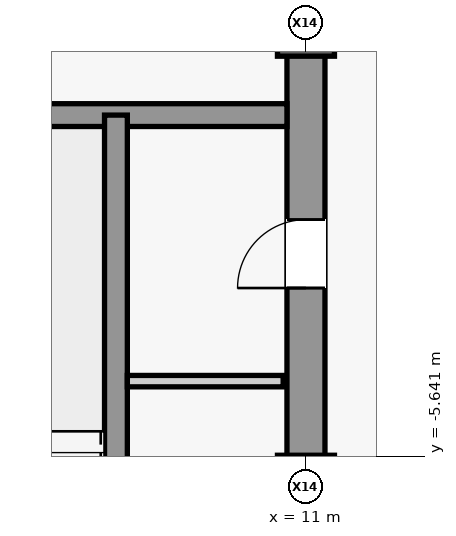
"""IFC4 building model, lengths in metres.
Left out: names, types, materials, properties, quantities, classifications, styles, units other than length and angle.
Written with IfcOpenShell. Run it as: python <this file> out.ifc"""

import sys

from ifc_helpers import new_model, si_unit, direction, frame, frame_2d, origin, origin_2d, place, context, subcontext, project, spatial, rectangle, extrude, source, transform, mapped, element, fill, save


model = new_model("IFC4")
c1 = context("Model", 3, precision=1e-05, world=origin(), true_north=direction((0.0, 1.0)))
c2 = subcontext(c1, "Body", "Model", "MODEL_VIEW")
j1 = project(units=[si_unit("LENGTHUNIT", "METRE"), si_unit("PLANEANGLEUNIT", "RADIAN")], contexts=[c1])
p1 = place(None, origin())
s1 = spatial("IfcSite", under=j1, at=p1, CompositionType="ELEMENT")
p2 = place(p1, origin())
s2 = spatial("IfcBuilding", under=s1, at=p2, CompositionType="ELEMENT")
p3 = place(p2, frame((0.0, 0.0, 389.9)))
s3 = spatial("IfcBuildingStorey", under=s2, at=p3, CompositionType="ELEMENT", Elevation=389.9)
m1 = source(origin(), c2, "Body", "SweptSolid", [
    extrude(rectangle(XDim=22.0, YDim=0.5, at=frame_2d((11.0, 0.0))), origin(), (0.0, 0.0, 1.0), 4.45),
])
p4 = place(p3, frame((11.0, -11.0, 0.0), z_axis=(0.0, 0.0, 1.0), x_axis=(0.0, 1.0, 0.0)))
e1 = element("IfcWall", 1, at=p4, inside=s3, PredefinedType="SHEAR", context=c2, shape_type="MappedRepresentation", body=[
    mapped(m1, transform((0.0, 0.0, 0.0), scale=1.0)),
])
m2 = source(origin(), c2, "Body", "SweptSolid", [
    extrude(rectangle(XDim=1.1, YDim=2.2, at=frame_2d((0.55, 1.1))), frame((0.0, 0.26, 0.0), z_axis=(0.0, -1.0, 0.0), x_axis=(1.0, 0.0, 0.0)), (0.0, 0.0, 1.0), 0.52),
])
p5 = place(p4, frame((0.8, 0.0, 0.0)))
e2 = element("IfcOpeningElement", 2, at=p5, cuts=e1, PredefinedType="OPENING", context=c2, shape_type="MappedRepresentation", body=[
    mapped(m2, transform((0.0, 0.0, 0.0), scale=1.0)),
])
m3 = source(origin(), c2, "Body", "SweptSolid", [
    extrude(rectangle(XDim=0.9, YDim=2.15, at=frame_2d((0.45, 1.075))), frame((0.0, 0.26, 0.0), z_axis=(0.0, -1.0, 0.0), x_axis=(1.0, 0.0, 0.0)), (0.0, 0.0, 1.0), 0.52),
])
p6 = place(p4, frame((7.575, 0.0, 0.0)))
e3 = element("IfcOpeningElement", 3, at=p6, cuts=e1, PredefinedType="OPENING", context=c2, shape_type="MappedRepresentation", body=[
    mapped(m3, transform((0.0, 0.0, 0.0), scale=1.0)),
])
m4 = source(origin(), c2, "Body", "SweptSolid", [
    extrude(rectangle(XDim=1.3, YDim=2.3, at=frame_2d((0.65, 1.15))), frame((0.0, 0.26, 0.0), z_axis=(0.0, -1.0, 0.0), x_axis=(1.0, 0.0, 0.0)), (0.0, 0.0, 1.0), 0.52),
])
p7 = place(p4, frame((2.7, 0.0, 0.0)))
e4 = element("IfcOpeningElement", 4, at=p7, cuts=e1, PredefinedType="OPENING", context=c2, shape_type="MappedRepresentation", body=[
    mapped(m4, transform((0.0, 0.0, 0.0), scale=1.0)),
])
p8 = place(p4, frame((13.35, 0.0, 0.0)))
e5 = element("IfcOpeningElement", 5, at=p8, cuts=e1, PredefinedType="OPENING", context=c2, shape_type="MappedRepresentation", body=[
    mapped(m4, transform((0.0, 0.0, 0.0), scale=1.0)),
])
m5 = source(origin(), c2, "Body", "SweptSolid", [
    extrude(rectangle(XDim=5.65, YDim=0.3, at=frame_2d((2.825, 0.0))), origin(), (0.0, 0.0, 1.0), 4.45),
])
p9 = place(p3, frame((5.1, -1.15, 0.0), z_axis=(0.0, 0.0, 1.0), x_axis=(1.0, 0.0, 0.0)))
e6 = element("IfcWall", 6, at=p9, inside=s3, PredefinedType="SHEAR", context=c2, shape_type="MappedRepresentation", body=[
    mapped(m5, transform((0.0, 0.0, 0.0), scale=1.0)),
])
m6 = source(origin(), c2, "Body", "SweptSolid", [
    extrude(rectangle(XDim=0.75, YDim=0.75, at=origin_2d()), origin(), (0.0, 0.0, 1.0), 4.8),
])
for number, where, z_axis, x_axis in (
    (7, (11.0, -6.0, 0.0), (0.0, 0.0, 1.0), (1.0, 0.0, 0.0)),
    (8, (11.0, 0.0, 0.0), (0.0, 0.0, 1.0), (1.0, 0.0, 0.0)),
):
    element("IfcColumn", number, at=place(p3, frame(where, z_axis=z_axis, x_axis=x_axis)), inside=s3, PredefinedType="COLUMN", context=c2, shape_type="MappedRepresentation", body=[
        mapped(m6, transform((0.0, 0.0, 0.0), scale=1.0)),
    ])
m7 = source(origin(), c2, "Body", "SweptSolid", [
    extrude(rectangle(XDim=7.8, YDim=0.3, at=frame_2d((3.9, 0.0))), origin(), (0.0, 0.0, 1.0), 4.45),
])
p10 = place(p3, frame((8.5, -8.95, 0.0), z_axis=(0.0, 0.0, 1.0), x_axis=(0.0, 1.0, 0.0)))
e9 = element("IfcWall", 9, at=p10, inside=s3, PredefinedType="SHEAR", context=c2, shape_type="MappedRepresentation", body=[
    mapped(m7, transform((0.0, 0.0, 0.0), scale=1.0)),
])
m8 = source(origin(), c2, "Body", "SweptSolid", [
    extrude(rectangle(XDim=2.05, YDim=0.15, at=frame_2d((1.025, 0.0))), origin(), (0.0, 0.0, 1.0), 4.45),
])
p11 = place(p3, frame((8.65, -4.65, 0.0), z_axis=(0.0, 0.0, 1.0), x_axis=(1.0, 0.0, 0.0)))
e10 = element("IfcWall", 10, at=p11, inside=s3, PredefinedType="PARTITIONING", context=c2, shape_type="MappedRepresentation", body=[
    mapped(m8, transform((0.0, 0.0, 0.0), scale=1.0)),
])
m9 = source(origin(), c2, "Body", "SweptSolid", [
    extrude(rectangle(XDim=0.9, YDim=2.15, at=frame_2d((0.45, 1.075))), frame((0.0, 0.025, 0.0), z_axis=(0.0, -1.0, 0.0), x_axis=(1.0, 0.0, 0.0)), (0.0, 0.0, 1.0), 0.05),
])
p12 = place(p6, origin())
e11 = element("IfcDoor", 11, at=p12, inside=s3, OperationType="SINGLE_SWING_LEFT", PredefinedType="DOOR", context=c2, shape_type="MappedRepresentation", body=[
    mapped(m9, transform((0.0, 0.0, 0.0), scale=1.0)),
])
fill(e3, e11)
save(model, sys.argv[1])
